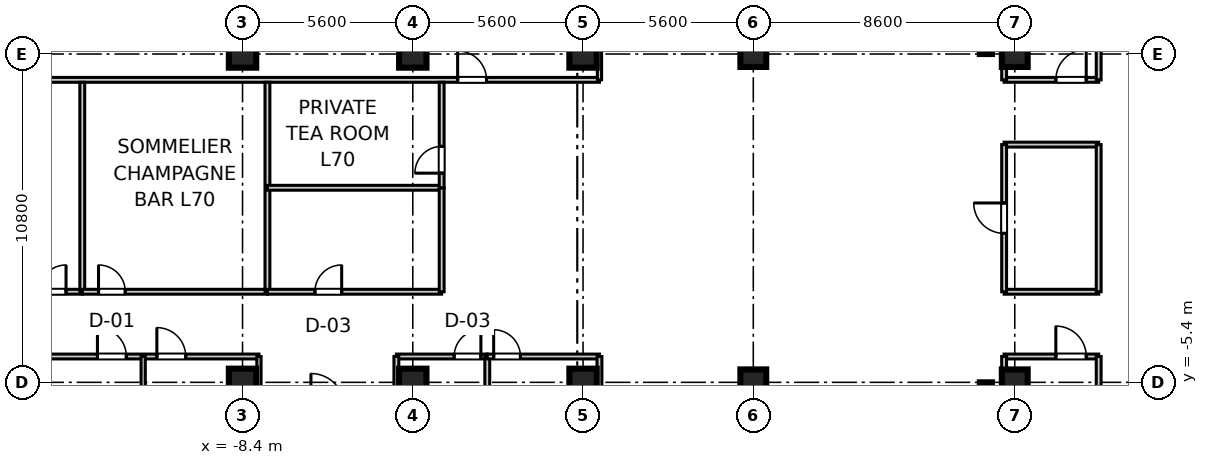
"""IFC4 building model, lengths in metres.
Left out: names, types, materials, properties, quantities, classifications, styles, units other than length and angle.
Written with IfcOpenShell. Run it as: python <this file> out.ifc"""

import sys

from ifc_helpers import new_model, si_unit, direction, frame, frame_2d, origin, origin_2d, place, context, subcontext, project, spatial, rectangle, extrude, source, transform, mapped, element, fill, save


model = new_model("IFC4")
c1 = context("Model", 3, precision=1e-05, world=origin(), true_north=direction((0.0, 1.0)))
c2 = subcontext(c1, "Body", "Model", "MODEL_VIEW")
j1 = project(units=[si_unit("LENGTHUNIT", "METRE"), si_unit("PLANEANGLEUNIT", "RADIAN")], contexts=[c1])
p1 = place(None, origin())
s1 = spatial("IfcSite", under=j1, at=p1, CompositionType="ELEMENT")
p2 = place(p1, origin())
s2 = spatial("IfcBuilding", under=s1, at=p2, CompositionType="ELEMENT")
p3 = place(p2, frame((0.0, 0.0, 273.8)))
s3 = spatial("IfcBuildingStorey", under=s2, at=p3, CompositionType="ELEMENT", Elevation=273.8)
m1 = source(origin(), c2, "Body", "SweptSolid", [
    extrude(rectangle(XDim=0.9, YDim=0.9, at=origin_2d()), origin(), (0.0, 0.0, 1.0), 3.705),
])
for number, where, z_axis, x_axis in (
    (1, (-8.4, -5.4, 0.0), (0.0, 0.0, 1.0), (1.0, 0.0, 0.0)),
    (2, (-8.4, 5.4, 0.0), (0.0, 0.0, 1.0), (1.0, 0.0, 0.0)),
    (3, (-2.8, -5.4, 0.0), (0.0, 0.0, 1.0), (1.0, 0.0, 0.0)),
    (4, (-2.8, 5.4, 0.0), (0.0, 0.0, 1.0), (1.0, 0.0, 0.0)),
    (5, (2.8, -5.4, 0.0), (0.0, 0.0, 1.0), (1.0, 0.0, 0.0)),
    (6, (2.8, 5.4, 0.0), (0.0, 0.0, 1.0), (1.0, 0.0, 0.0)),
):
    element("IfcColumn", number, at=place(p3, frame(where, z_axis=z_axis, x_axis=x_axis)), inside=s3, PredefinedType="COLUMN", context=c2, shape_type="MappedRepresentation", body=[
        mapped(m1, transform((0.0, 0.0, 0.0), scale=1.0)),
    ])
m2 = source(origin(), c2, "Body", "SweptSolid", [
    extrude(rectangle(XDim=0.85, YDim=0.85, at=origin_2d()), origin(), (0.0, 0.0, 1.0), 3.705),
])
for number, where, z_axis, x_axis in (
    (7, (8.4, -5.4, 0.0), (0.0, 0.0, 1.0), (1.0, 0.0, 0.0)),
    (8, (8.4, 5.4, 0.0), (0.0, 0.0, 1.0), (1.0, 0.0, 0.0)),
    (9, (17.0, -5.4, 0.0), (0.0, 0.0, 1.0), (1.0, 0.0, 0.0)),
    (10, (17.0, 5.4, 0.0), (0.0, 0.0, 1.0), (1.0, 0.0, 0.0)),
):
    element("IfcColumn", number, at=place(p3, frame(where, z_axis=z_axis, x_axis=x_axis)), inside=s3, PredefinedType="PILASTER", context=c2, shape_type="MappedRepresentation", body=[
        mapped(m2, transform((0.0, 0.0, 0.0), scale=1.0)),
    ])
m3 = source(origin(), c2, "Body", "SweptSolid", [
    extrude(rectangle(XDim=11.6, YDim=0.4, at=frame_2d((5.8, 0.0))), origin(), (0.0, 0.0, 1.0), 3.45),
])
for number, where, z_axis, x_axis in (
    (11, (16.05, 5.4, 0.0), (0.0, 0.0, 1.0), (0.0, 1.0, 0.0)),
    (12, (16.05, -17.0, 0.0), (0.0, 0.0, 1.0), (0.0, 1.0, 0.0)),
):
    element("IfcWall", number, at=place(p3, frame(where, z_axis=z_axis, x_axis=x_axis)), inside=s3, PredefinedType="SHEAR", context=c2, shape_type="MappedRepresentation", body=[
        mapped(m3, transform((0.0, 0.0, 0.0), scale=1.0)),
    ])
m4 = source(origin(), c2, "Body", "SweptSolid", [
    extrude(rectangle(XDim=3.11, YDim=0.16, at=frame_2d((1.555, 0.0))), origin(), (0.0, 0.0, 1.0), 2.79),
])
p4 = place(p3, frame((16.65, 4.55, 0.0), z_axis=(0.0, 0.0, 1.0), x_axis=(1.0, 0.0, 0.0)))
e13 = element("IfcWall", 13, at=p4, inside=s3, PredefinedType="PARTITIONING", context=c2, shape_type="MappedRepresentation", body=[
    mapped(m4, transform((0.0, 0.0, 0.0), scale=1.0)),
])
p5 = place(p4, frame((1.701, 0.0, 0.0)))
e14 = element("IfcOpeningElement", 14, at=p5, cuts=e13, PredefinedType="OPENING", context=c2, shape_type="SweptSolid", body=[
    extrude(rectangle(XDim=1.0, YDim=2.1, at=frame_2d((0.5, 1.05))), frame((0.0, 0.09, 0.0), z_axis=(0.0, -1.0, 0.0), x_axis=(1.0, 0.0, 0.0)), (0.0, 0.0, 1.0), 0.18),
])
m5 = source(origin(), c2, "Body", "SweptSolid", [
    extrude(rectangle(XDim=17.95, YDim=0.16, at=frame_2d((8.975, 0.0))), origin(), (0.0, 0.0, 1.0), 2.79),
])
p6 = place(p3, frame((16.65, 4.55, 0.0), z_axis=(0.0, 0.0, 1.0), x_axis=(0.0, 1.0, 0.0)))
e15 = element("IfcWall", 15, at=p6, inside=s3, PredefinedType="PARTITIONING", context=c2, shape_type="MappedRepresentation", body=[
    mapped(m5, transform((0.0, 0.0, 0.0), scale=1.0)),
])
m6 = source(origin(), c2, "Body", "SweptSolid", [
    extrude(rectangle(XDim=16.53, YDim=0.16, at=frame_2d((8.265, 0.0))), origin(), (0.0, 0.0, 1.0), 2.79),
])
p7 = place(p3, frame((19.76, 4.55, 0.0), z_axis=(0.0, 0.0, 1.0), x_axis=(0.0, 1.0, 0.0)))
e16 = element("IfcWall", 16, at=p7, inside=s3, PredefinedType="PARTITIONING", context=c2, shape_type="MappedRepresentation", body=[
    mapped(m6, transform((0.0, 0.0, 0.0), scale=1.0)),
])
p8 = place(p3, frame((16.65, -4.55, 0.0), z_axis=(0.0, 0.0, 1.0), x_axis=(1.0, 0.0, 0.0)))
e17 = element("IfcWall", 17, at=p8, inside=s3, PredefinedType="PARTITIONING", context=c2, shape_type="MappedRepresentation", body=[
    mapped(m4, transform((0.0, 0.0, 0.0), scale=1.0)),
])
p9 = place(p8, frame((1.701, 0.0, 0.0)))
e18 = element("IfcOpeningElement", 18, at=p9, cuts=e17, PredefinedType="OPENING", context=c2, shape_type="SweptSolid", body=[
    extrude(rectangle(XDim=1.0, YDim=2.1, at=frame_2d((0.5, 1.05))), frame((0.0, 0.09, 0.0), z_axis=(0.0, -1.0, 0.0), x_axis=(1.0, 0.0, 0.0)), (0.0, 0.0, 1.0), 0.18),
])
p10 = place(p3, frame((16.65, -22.5, 0.0), z_axis=(0.0, 0.0, 1.0), x_axis=(0.0, 1.0, 0.0)))
e19 = element("IfcWall", 19, at=p10, inside=s3, PredefinedType="PARTITIONING", context=c2, shape_type="MappedRepresentation", body=[
    mapped(m5, transform((0.0, 0.0, 0.0), scale=1.0)),
])
p11 = place(p3, frame((19.76, -21.08, 0.0), z_axis=(0.0, 0.0, 1.0), x_axis=(0.0, 1.0, 0.0)))
e20 = element("IfcWall", 20, at=p11, inside=s3, PredefinedType="PARTITIONING", context=c2, shape_type="MappedRepresentation", body=[
    mapped(m6, transform((0.0, 0.0, 0.0), scale=1.0)),
])
m7 = source(origin(), c2, "Body", "SweptSolid", [
    extrude(rectangle(XDim=23.1, YDim=0.16, at=frame_2d((11.55, 0.0))), origin(), (0.0, 0.0, 1.0), 2.79),
])
p12 = place(p3, frame((-19.76, 4.55, 0.0), z_axis=(0.0, 0.0, 1.0), x_axis=(1.0, 0.0, 0.0)))
e21 = element("IfcWall", 21, at=p12, inside=s3, PredefinedType="PARTITIONING", context=c2, shape_type="MappedRepresentation", body=[
    mapped(m7, transform((0.0, 0.0, 0.0), scale=1.0)),
])
p13 = place(p12, frame((18.435, 0.0, 0.0)))
e22 = element("IfcOpeningElement", 22, at=p13, cuts=e21, PredefinedType="OPENING", context=c2, shape_type="SweptSolid", body=[
    extrude(rectangle(XDim=0.95, YDim=2.1, at=frame_2d((0.475, 1.05))), frame((0.0, 0.09, 0.0), z_axis=(0.0, -1.0, 0.0), x_axis=(1.0, 0.0, 0.0)), (0.0, 0.0, 1.0), 0.18),
])
m8 = source(origin(), c2, "Body", "SweptSolid", [
    extrude(rectangle(XDim=17.95, YDim=0.14, at=frame_2d((8.975, 0.0))), origin(), (0.0, 0.0, 1.0), 2.79),
])
p14 = place(p3, frame((3.34, 4.55, 0.0), z_axis=(0.0, 0.0, 1.0), x_axis=(0.0, 1.0, 0.0)))
e23 = element("IfcWall", 23, at=p14, inside=s3, PredefinedType="PARTITIONING", context=c2, shape_type="MappedRepresentation", body=[
    mapped(m8, transform((0.0, 0.0, 0.0), scale=1.0)),
])
m9 = source(origin(), c2, "Body", "SweptSolid", [
    extrude(rectangle(XDim=11.9, YDim=0.16, at=frame_2d((5.95, 0.0))), origin(), (0.0, 0.0, 1.0), 2.79),
])
p15 = place(p3, frame((-19.76, -4.55, 0.0), z_axis=(0.0, 0.0, 1.0), x_axis=(1.0, 0.0, 0.0)))
e24 = element("IfcWall", 24, at=p15, inside=s3, PredefinedType="PARTITIONING", context=c2, shape_type="MappedRepresentation", body=[
    mapped(m9, transform((0.0, 0.0, 0.0), scale=1.0)),
])
p16 = place(p15, frame((0.455, 0.0, 0.0)))
e25 = element("IfcOpeningElement", 25, at=p16, cuts=e24, PredefinedType="OPENING", context=c2, shape_type="SweptSolid", body=[
    extrude(rectangle(XDim=0.95, YDim=2.1, at=frame_2d((0.475, 1.05))), frame((0.0, 0.09, 0.0), z_axis=(0.0, -1.0, 0.0), x_axis=(1.0, 0.0, 0.0)), (0.0, 0.0, 1.0), 0.18),
])
p17 = place(p15, frame((6.588, 0.0, 0.0)))
e26 = element("IfcOpeningElement", 26, at=p17, cuts=e24, PredefinedType="OPENING", context=c2, shape_type="SweptSolid", body=[
    extrude(rectangle(XDim=0.95, YDim=2.1, at=frame_2d((0.475, 1.05))), frame((0.0, 0.09, 0.0), z_axis=(0.0, -1.0, 0.0), x_axis=(1.0, 0.0, 0.0)), (0.0, 0.0, 1.0), 0.18),
])
p18 = place(p15, frame((8.542, 0.0, 0.0)))
e27 = element("IfcOpeningElement", 27, at=p18, cuts=e24, PredefinedType="OPENING", context=c2, shape_type="SweptSolid", body=[
    extrude(rectangle(XDim=0.95, YDim=2.1, at=frame_2d((0.475, 1.05))), frame((0.0, 0.09, 0.0), z_axis=(0.0, -1.0, 0.0), x_axis=(1.0, 0.0, 0.0)), (0.0, 0.0, 1.0), 0.18),
])
for number, where, z_axis, x_axis in (
    (28, (-7.86, -22.5, 0.0), (0.0, 0.0, 1.0), (0.0, 1.0, 0.0)),
    (29, (-11.668, -22.5, 0.0), (0.0, 0.0, 1.0), (0.0, 1.0, 0.0)),
):
    element("IfcWall", number, at=place(p3, frame(where, z_axis=z_axis, x_axis=x_axis)), inside=s3, PredefinedType="PARTITIONING", context=c2, shape_type="MappedRepresentation", body=[
        mapped(m8, transform((0.0, 0.0, 0.0), scale=1.0)),
    ])
m10 = source(origin(), c2, "Body", "SweptSolid", [
    extrude(rectangle(XDim=2.99, YDim=0.16, at=frame_2d((1.495, 0.0))), origin(), (0.0, 0.0, 1.0), 2.79),
])
p19 = place(p3, frame((-3.34, -4.55, 0.0), z_axis=(0.0, 0.0, 1.0), x_axis=(1.0, 0.0, 0.0)))
e30 = element("IfcWall", 30, at=p19, inside=s3, PredefinedType="PARTITIONING", context=c2, shape_type="MappedRepresentation", body=[
    mapped(m10, transform((0.0, 0.0, 0.0), scale=1.0)),
])
p20 = place(p19, frame((1.9, 0.0, 0.0)))
e31 = element("IfcOpeningElement", 31, at=p20, cuts=e30, PredefinedType="OPENING", context=c2, shape_type="SweptSolid", body=[
    extrude(rectangle(XDim=0.88, YDim=2.1, at=frame_2d((0.44, 1.05))), frame((0.0, 0.09, 0.0), z_axis=(0.0, -1.0, 0.0), x_axis=(1.0, 0.0, 0.0)), (0.0, 0.0, 1.0), 0.18),
])
for number, where, z_axis, x_axis in (
    (32, (-3.34, -22.5, 0.0), (0.0, 0.0, 1.0), (0.0, 1.0, 0.0)),
    (33, (-0.35, -22.5, 0.0), (0.0, 0.0, 1.0), (0.0, 1.0, 0.0)),
):
    element("IfcWall", number, at=place(p3, frame(where, z_axis=z_axis, x_axis=x_axis)), inside=s3, PredefinedType="PARTITIONING", context=c2, shape_type="MappedRepresentation", body=[
        mapped(m5, transform((0.0, 0.0, 0.0), scale=1.0)),
    ])
m11 = source(origin(), c2, "Body", "SweptSolid", [
    extrude(rectangle(XDim=3.69, YDim=0.16, at=frame_2d((1.845, 0.0))), origin(), (0.0, 0.0, 1.0), 2.79),
])
p21 = place(p3, frame((-0.35, -4.55, 0.0), z_axis=(0.0, 0.0, 1.0), x_axis=(1.0, 0.0, 0.0)))
e34 = element("IfcWall", 34, at=p21, inside=s3, PredefinedType="PARTITIONING", context=c2, shape_type="MappedRepresentation", body=[
    mapped(m11, transform((0.0, 0.0, 0.0), scale=1.0)),
])
p22 = place(p21, frame((0.21, 0.0, 0.0)))
e35 = element("IfcOpeningElement", 35, at=p22, cuts=e34, PredefinedType="OPENING", context=c2, shape_type="SweptSolid", body=[
    extrude(rectangle(XDim=0.88, YDim=2.1, at=frame_2d((0.44, 1.05))), frame((0.0, 0.09, 0.0), z_axis=(0.0, -1.0, 0.0), x_axis=(1.0, 0.0, 0.0)), (0.0, 0.0, 1.0), 0.18),
])
p23 = place(p3, frame((3.34, -22.5, 0.0), z_axis=(0.0, 0.0, 1.0), x_axis=(0.0, 1.0, 0.0)))
e36 = element("IfcWall", 36, at=p23, inside=s3, PredefinedType="PARTITIONING", context=c2, shape_type="MappedRepresentation", body=[
    mapped(m5, transform((0.0, 0.0, 0.0), scale=1.0)),
])
m12 = source(origin(), c2, "Body", "SweptSolid", [
    extrude(rectangle(XDim=6.089, YDim=0.16, at=frame_2d((3.044, 0.0))), origin(), (0.0, 0.0, 1.0), 2.79),
])
p24 = place(p3, frame((-19.76, -2.42, 0.0), z_axis=(0.0, 0.0, 1.0), x_axis=(1.0, 0.0, 0.0)))
e37 = element("IfcWall", 37, at=p24, inside=s3, PredefinedType="PARTITIONING", context=c2, shape_type="MappedRepresentation", body=[
    mapped(m12, transform((0.0, 0.0, 0.0), scale=1.0)),
])
p25 = place(p24, frame((4.675, 0.0, 0.0)))
e38 = element("IfcOpeningElement", 38, at=p25, cuts=e37, PredefinedType="OPENING", context=c2, shape_type="SweptSolid", body=[
    extrude(rectangle(XDim=0.88, YDim=2.1, at=frame_2d((0.44, 1.05))), frame((0.0, 0.09, 0.0), z_axis=(0.0, -1.0, 0.0), x_axis=(1.0, 0.0, 0.0)), (0.0, 0.0, 1.0), 0.18),
])
m13 = source(origin(), c2, "Body", "SweptSolid", [
    extrude(rectangle(XDim=6.89, YDim=0.16, at=frame_2d((3.445, 0.0))), origin(), (0.0, 0.0, 1.0), 2.79),
])
p26 = place(p3, frame((-13.671, -2.42, 0.0), z_axis=(0.0, 0.0, 1.0), x_axis=(0.0, 1.0, 0.0)))
e39 = element("IfcWall", 39, at=p26, inside=s3, PredefinedType="PARTITIONING", context=c2, shape_type="MappedRepresentation", body=[
    mapped(m13, transform((0.0, 0.0, 0.0), scale=1.0)),
])
m14 = source(origin(), c2, "Body", "SweptSolid", [
    extrude(rectangle(XDim=6.09, YDim=0.16, at=frame_2d((3.045, 0.0))), origin(), (0.0, 0.0, 1.0), 2.79),
])
p27 = place(p3, frame((-13.671, -2.42, 0.0), z_axis=(0.0, 0.0, 1.0), x_axis=(1.0, 0.0, 0.0)))
e40 = element("IfcWall", 40, at=p27, inside=s3, PredefinedType="PARTITIONING", context=c2, shape_type="MappedRepresentation", body=[
    mapped(m14, transform((0.0, 0.0, 0.0), scale=1.0)),
])
p28 = place(p27, frame((0.534, 0.0, 0.0)))
e41 = element("IfcOpeningElement", 41, at=p28, cuts=e40, PredefinedType="OPENING", context=c2, shape_type="SweptSolid", body=[
    extrude(rectangle(XDim=0.88, YDim=2.1, at=frame_2d((0.44, 1.05))), frame((0.0, 0.09, 0.0), z_axis=(0.0, -1.0, 0.0), x_axis=(1.0, 0.0, 0.0)), (0.0, 0.0, 1.0), 0.18),
])
p29 = place(p3, frame((-7.581, -2.42, 0.0), z_axis=(0.0, 0.0, 1.0), x_axis=(0.0, 1.0, 0.0)))
e42 = element("IfcWall", 42, at=p29, inside=s3, PredefinedType="PARTITIONING", context=c2, shape_type="MappedRepresentation", body=[
    mapped(m13, transform((0.0, 0.0, 0.0), scale=1.0)),
])
m15 = source(origin(), c2, "Body", "SweptSolid", [
    extrude(rectangle(XDim=5.731, YDim=0.16, at=frame_2d((2.865, 0.0))), origin(), (0.0, 0.0, 1.0), 2.79),
])
p30 = place(p3, frame((-7.581, -2.42, 0.0), z_axis=(0.0, 0.0, 1.0), x_axis=(1.0, 0.0, 0.0)))
e43 = element("IfcWall", 43, at=p30, inside=s3, PredefinedType="PARTITIONING", context=c2, shape_type="MappedRepresentation", body=[
    mapped(m15, transform((0.0, 0.0, 0.0), scale=1.0)),
])
p31 = place(p30, frame((1.562, 0.0, 0.0)))
e44 = element("IfcOpeningElement", 44, at=p31, cuts=e43, PredefinedType="OPENING", context=c2, shape_type="SweptSolid", body=[
    extrude(rectangle(XDim=0.88, YDim=2.1, at=frame_2d((0.44, 1.05))), frame((0.0, 0.09, 0.0), z_axis=(0.0, -1.0, 0.0), x_axis=(1.0, 0.0, 0.0)), (0.0, 0.0, 1.0), 0.18),
])
p32 = place(p3, frame((-7.581, 1.0, 0.0), z_axis=(0.0, 0.0, 1.0), x_axis=(1.0, 0.0, 0.0)))
e45 = element("IfcWall", 45, at=p32, inside=s3, PredefinedType="PARTITIONING", context=c2, shape_type="MappedRepresentation", body=[
    mapped(m15, transform((0.0, 0.0, 0.0), scale=1.0)),
])
m16 = source(origin(), c2, "Body", "SweptSolid", [
    extrude(rectangle(XDim=3.42, YDim=0.16, at=frame_2d((1.71, 0.0))), origin(), (0.0, 0.0, 1.0), 2.79),
])
p33 = place(p3, frame((-1.85, -2.42, 0.0), z_axis=(0.0, 0.0, 1.0), x_axis=(0.0, 1.0, 0.0)))
e46 = element("IfcWall", 46, at=p33, inside=s3, PredefinedType="PARTITIONING", context=c2, shape_type="MappedRepresentation", body=[
    mapped(m16, transform((0.0, 0.0, 0.0), scale=1.0)),
])
m17 = source(origin(), c2, "Body", "SweptSolid", [
    extrude(rectangle(XDim=3.47, YDim=0.16, at=frame_2d((1.735, 0.0))), origin(), (0.0, 0.0, 1.0), 2.79),
])
p34 = place(p3, frame((-1.85, 1.0, 0.0), z_axis=(0.0, 0.0, 1.0), x_axis=(0.0, 1.0, 0.0)))
e47 = element("IfcWall", 47, at=p34, inside=s3, PredefinedType="PARTITIONING", context=c2, shape_type="MappedRepresentation", body=[
    mapped(m17, transform((0.0, 0.0, 0.0), scale=1.0)),
])
p35 = place(p34, frame((0.481, 0.0, 0.0)))
e48 = element("IfcOpeningElement", 48, at=p35, cuts=e47, PredefinedType="OPENING", context=c2, shape_type="SweptSolid", body=[
    extrude(rectangle(XDim=0.88, YDim=2.1, at=frame_2d((0.44, 1.05))), frame((0.0, 0.09, 0.0), z_axis=(0.0, -1.0, 0.0), x_axis=(1.0, 0.0, 0.0)), (0.0, 0.0, 1.0), 0.18),
])
for number, where, z_axis, x_axis in (
    (49, (16.65, -2.42, 0.0), (0.0, 0.0, 1.0), (1.0, 0.0, 0.0)),
    (50, (16.65, 2.42, 0.0), (0.0, 0.0, 1.0), (1.0, 0.0, 0.0)),
):
    element("IfcWall", number, at=place(p3, frame(where, z_axis=z_axis, x_axis=x_axis)), inside=s3, PredefinedType="PARTITIONING", context=c2, shape_type="MappedRepresentation", body=[
        mapped(m4, transform((0.0, 0.0, 0.0), scale=1.0)),
    ])
m18 = source(origin(), c2, "Body", "SweptSolid", [
    extrude(rectangle(XDim=4.84, YDim=0.16, at=frame_2d((2.42, 0.0))), origin(), (0.0, 0.0, 1.0), 2.79),
])
p36 = place(p3, frame((16.65, -2.42, 0.0), z_axis=(0.0, 0.0, 1.0), x_axis=(0.0, 1.0, 0.0)))
e51 = element("IfcWall", 51, at=p36, inside=s3, PredefinedType="PARTITIONING", context=c2, shape_type="MappedRepresentation", body=[
    mapped(m18, transform((0.0, 0.0, 0.0), scale=1.0)),
])
p37 = place(p36, frame((1.92, 0.0, 0.0)))
e52 = element("IfcOpeningElement", 52, at=p37, cuts=e51, PredefinedType="OPENING", context=c2, shape_type="SweptSolid", body=[
    extrude(rectangle(XDim=1.0, YDim=2.1, at=frame_2d((0.5, 1.05))), frame((0.0, 0.09, 0.0), z_axis=(0.0, -1.0, 0.0), x_axis=(1.0, 0.0, 0.0)), (0.0, 0.0, 1.0), 0.18),
])
p38 = place(p3, frame((19.76, -2.42, 0.0), z_axis=(0.0, 0.0, 1.0), x_axis=(0.0, 1.0, 0.0)))
e53 = element("IfcWall", 53, at=p38, inside=s3, PredefinedType="PARTITIONING", context=c2, shape_type="MappedRepresentation", body=[
    mapped(m18, transform((0.0, 0.0, 0.0), scale=1.0)),
])
m19 = source(origin(), c2, "Body", "SweptSolid", [
    extrude(rectangle(XDim=1.0, YDim=2.1, at=frame_2d((0.5, 1.05))), frame((0.0, 0.025, 0.0), z_axis=(0.0, -1.0, 0.0), x_axis=(1.0, 0.0, 0.0)), (0.0, 0.0, 1.0), 0.05),
])
p39 = place(p5, origin())
e54 = element("IfcDoor", 54, at=p39, inside=s3, OperationType="SINGLE_SWING_RIGHT", PredefinedType="DOOR", context=c2, shape_type="MappedRepresentation", body=[
    mapped(m19, transform((0.0, 0.0, 0.0), scale=1.0)),
])
fill(e14, e54)
p40 = place(p9, frame((1.0, 0.0, 0.0), z_axis=(0.0, 0.0, 1.0), x_axis=(-1.0, 0.0, 0.0)))
e55 = element("IfcDoor", 55, at=p40, inside=s3, OperationType="SINGLE_SWING_LEFT", PredefinedType="DOOR", context=c2, shape_type="MappedRepresentation", body=[
    mapped(m19, transform((0.0, 0.0, 0.0), scale=1.0)),
])
fill(e18, e55)
m20 = source(origin(), c2, "Body", "SweptSolid", [
    extrude(rectangle(XDim=0.95, YDim=2.1, at=frame_2d((0.475, 1.05))), frame((0.0, 0.025, 0.0), z_axis=(0.0, -1.0, 0.0), x_axis=(1.0, 0.0, 0.0)), (0.0, 0.0, 1.0), 0.05),
])
p41 = place(p13, origin())
e56 = element("IfcDoor", 56, at=p41, inside=s3, OperationType="SINGLE_SWING_LEFT", PredefinedType="DOOR", context=c2, shape_type="MappedRepresentation", body=[
    mapped(m20, transform((0.0, 0.0, 0.0), scale=1.0)),
])
fill(e22, e56)
p42 = place(p17, frame((0.95, 0.0, 0.0), z_axis=(0.0, 0.0, 1.0), x_axis=(-1.0, 0.0, 0.0)))
e57 = element("IfcDoor", 57, at=p42, inside=s3, OperationType="SINGLE_SWING_LEFT", PredefinedType="DOOR", context=c2, shape_type="MappedRepresentation", body=[
    mapped(m20, transform((0.0, 0.0, 0.0), scale=1.0)),
])
fill(e26, e57)
p43 = place(p18, frame((0.95, 0.0, 0.0), z_axis=(0.0, 0.0, 1.0), x_axis=(-1.0, 0.0, 0.0)))
e58 = element("IfcDoor", 58, at=p43, inside=s3, OperationType="SINGLE_SWING_LEFT", PredefinedType="DOOR", context=c2, shape_type="MappedRepresentation", body=[
    mapped(m20, transform((0.0, 0.0, 0.0), scale=1.0)),
])
fill(e27, e58)
m21 = source(origin(), c2, "Body", "SweptSolid", [
    extrude(rectangle(XDim=0.88, YDim=2.1, at=frame_2d((0.44, 1.05))), frame((0.0, 0.025, 0.0), z_axis=(0.0, -1.0, 0.0), x_axis=(1.0, 0.0, 0.0)), (0.0, 0.0, 1.0), 0.05),
])
p44 = place(p20, frame((0.88, 0.0, 0.0), z_axis=(0.0, 0.0, 1.0), x_axis=(-1.0, 0.0, 0.0)))
e59 = element("IfcDoor", 59, at=p44, inside=s3, OperationType="SINGLE_SWING_RIGHT", PredefinedType="DOOR", context=c2, shape_type="MappedRepresentation", body=[
    mapped(m21, transform((0.0, 0.0, 0.0), scale=1.0)),
])
fill(e31, e59)
p45 = place(p22, frame((0.88, 0.0, 0.0), z_axis=(0.0, 0.0, 1.0), x_axis=(-1.0, 0.0, 0.0)))
e60 = element("IfcDoor", 60, at=p45, inside=s3, OperationType="SINGLE_SWING_LEFT", PredefinedType="DOOR", context=c2, shape_type="MappedRepresentation", body=[
    mapped(m21, transform((0.0, 0.0, 0.0), scale=1.0)),
])
fill(e35, e60)
p46 = place(p25, origin())
e61 = element("IfcDoor", 61, at=p46, inside=s3, OperationType="SINGLE_SWING_RIGHT", PredefinedType="DOOR", context=c2, shape_type="MappedRepresentation", body=[
    mapped(m21, transform((0.0, 0.0, 0.0), scale=1.0)),
])
fill(e38, e61)
p47 = place(p28, origin())
e62 = element("IfcDoor", 62, at=p47, inside=s3, OperationType="SINGLE_SWING_LEFT", PredefinedType="DOOR", context=c2, shape_type="MappedRepresentation", body=[
    mapped(m21, transform((0.0, 0.0, 0.0), scale=1.0)),
])
fill(e41, e62)
p48 = place(p31, origin())
e63 = element("IfcDoor", 63, at=p48, inside=s3, OperationType="SINGLE_SWING_RIGHT", PredefinedType="DOOR", context=c2, shape_type="MappedRepresentation", body=[
    mapped(m21, transform((0.0, 0.0, 0.0), scale=1.0)),
])
fill(e44, e63)
p49 = place(p35, origin())
e64 = element("IfcDoor", 64, at=p49, inside=s3, OperationType="SINGLE_SWING_LEFT", PredefinedType="DOOR", context=c2, shape_type="MappedRepresentation", body=[
    mapped(m21, transform((0.0, 0.0, 0.0), scale=1.0)),
])
fill(e48, e64)
p50 = place(p37, frame((1.0, 0.0, 0.0), z_axis=(0.0, 0.0, 1.0), x_axis=(-1.0, 0.0, 0.0)))
e65 = element("IfcDoor", 65, at=p50, inside=s3, OperationType="SINGLE_SWING_RIGHT", PredefinedType="DOOR", context=c2, shape_type="MappedRepresentation", body=[
    mapped(m19, transform((0.0, 0.0, 0.0), scale=1.0)),
])
fill(e52, e65)
save(model, sys.argv[1])
